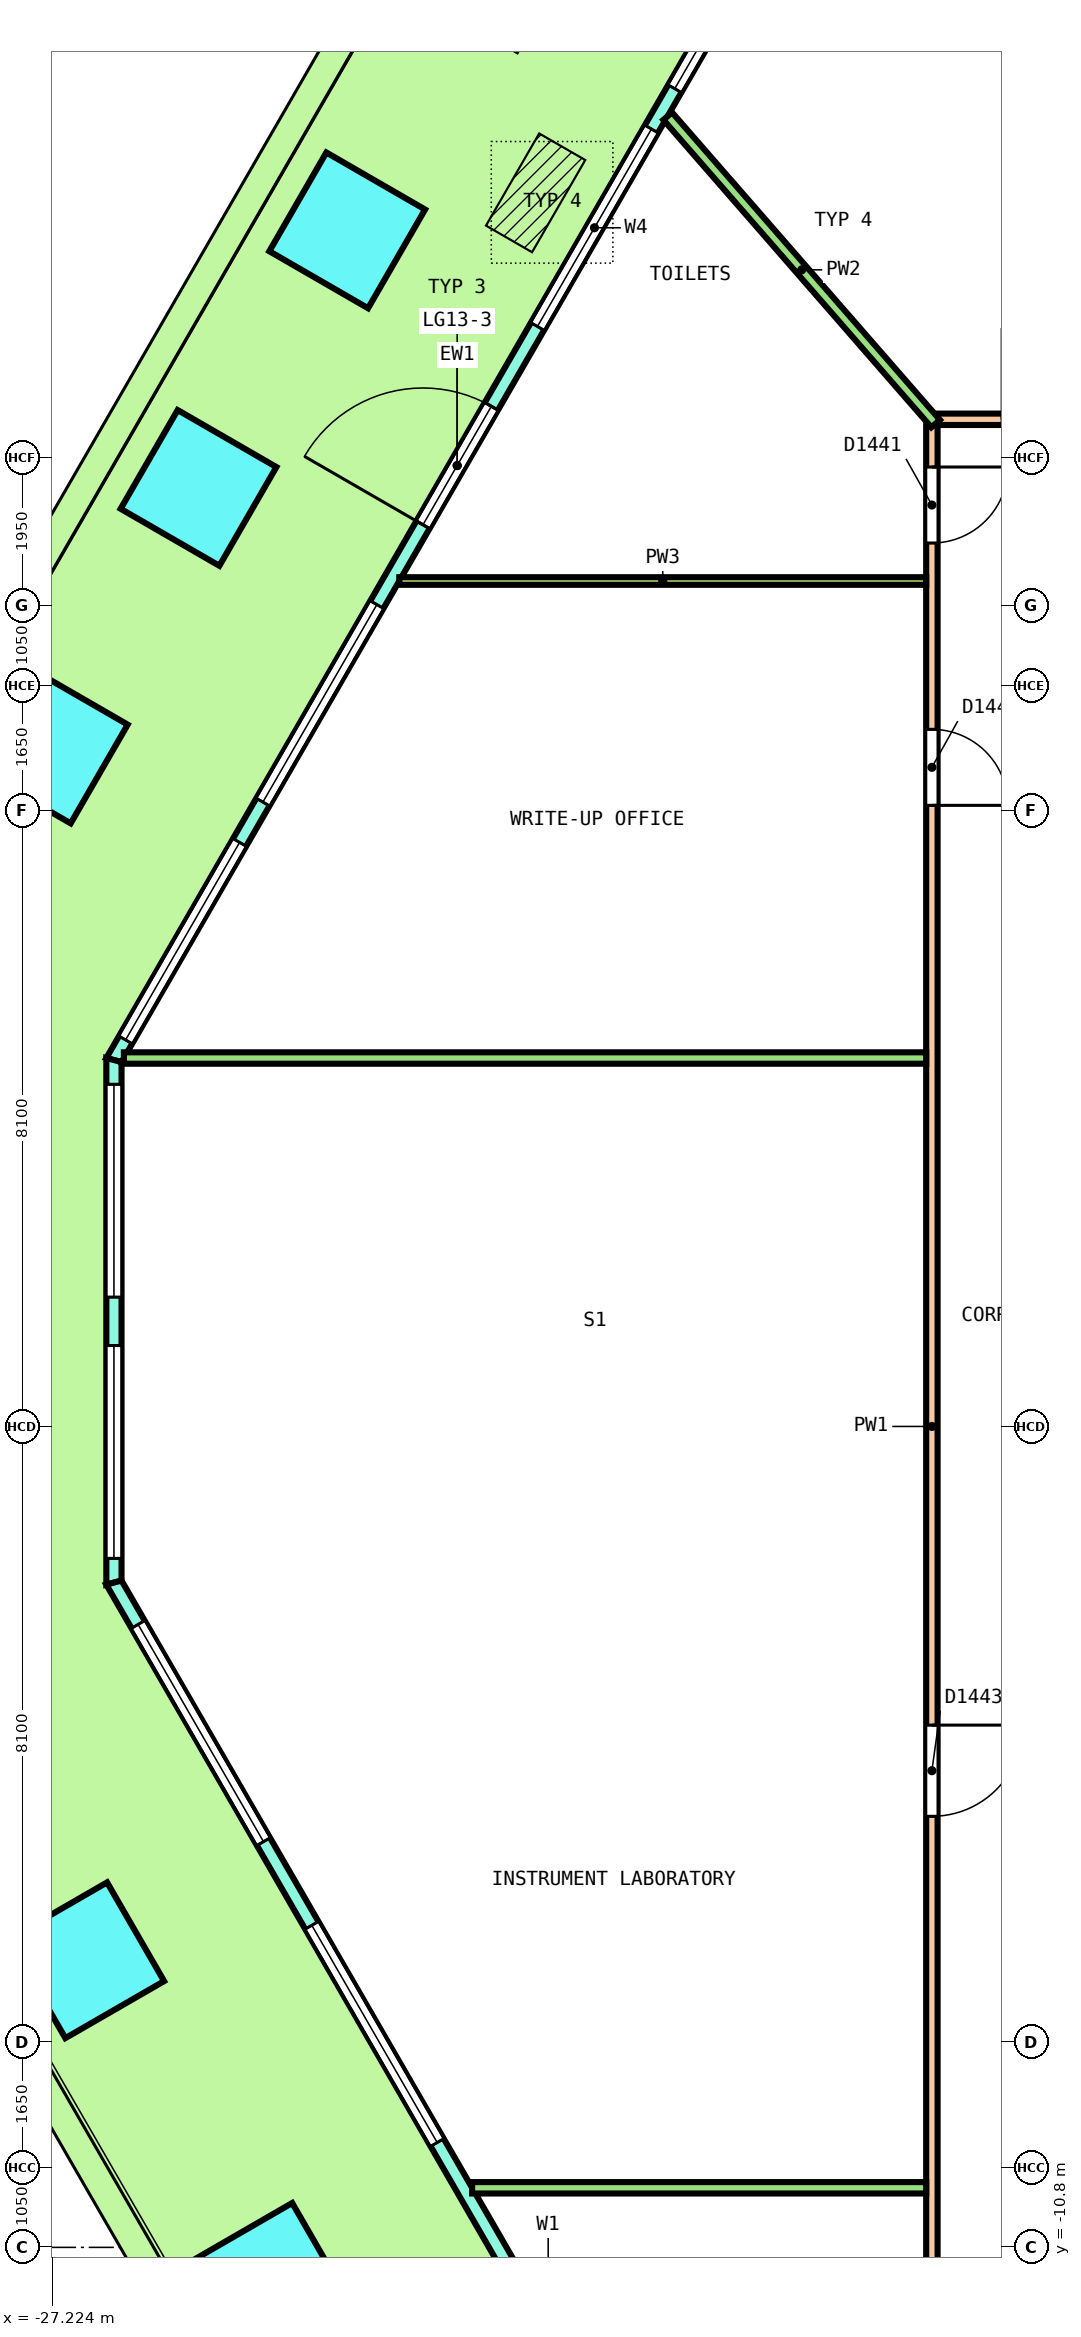
"""IFC4 building model, lengths in metres.
Left out: names, types, materials, properties, quantities, classifications, styles, units other than length and angle.
Written with IfcOpenShell. Run it as: python <this file> out.ifc"""

import sys

from ifc_helpers import new_model, si_unit, direction, frame, frame_2d, origin, origin_2d, place, context, subcontext, project, spatial, polyline, rectangle, outline, extrude, element, fill, save


model = new_model("IFC4")
c1 = context("Model", 3, precision=1e-05, world=origin(), true_north=direction((0.0, 1.0)))
c2 = subcontext(c1, "Body", "Model", "MODEL_VIEW")
j1 = project(units=[si_unit("LENGTHUNIT", "METRE"), si_unit("PLANEANGLEUNIT", "RADIAN")], contexts=[c1])
p1 = place(None, origin())
s1 = spatial("IfcSite", under=j1, at=p1, CompositionType="ELEMENT")
p2 = place(p1, origin())
s2 = spatial("IfcBuilding", under=s1, at=p2, CompositionType="ELEMENT")
p3 = place(p2, frame((0.0, 0.0, 58.6)))
s3 = spatial("IfcBuildingStorey", under=s2, at=p3, CompositionType="ELEMENT", Elevation=58.6)
for number, where, z_axis, x_axis in (
    (1, (-23.342, 15.736, 0.0), (0.0, 0.0, 1.0), (-0.5, -0.866, 0.0)),
    (2, (-25.299, 12.347, 0.0), (0.0, 0.0, 1.0), (-0.5, -0.866, 0.0)),
    (3, (-27.255, 8.959, 0.0), (0.0, 0.0, 1.0), (-0.5, -0.866, 0.0)),
    (4, (-26.776, -7.023, 0.0), (0.0, 0.0, 1.0), (0.5, -0.866, 0.0)),
    (5, (-24.341, -11.241, 0.0), (0.0, 0.0, 1.0), (0.5, -0.866, 0.0)),
):
    element("IfcColumn", number, at=place(p3, frame(where, z_axis=z_axis, x_axis=x_axis)), inside=s3, PredefinedType="COLUMN", context=c2, shape_type="SweptSolid", body=[
        extrude(rectangle(XDim=1.5, YDim=1.5, at=origin_2d()), origin(), (0.0, 0.0, 1.0), 4.05),
    ])
p4 = place(p3, frame((-17.38, 20.463, 0.0), z_axis=(0.0, 0.0, 1.0), x_axis=(-0.500000137386, -0.866025324465, 0.0)))
e6 = element("IfcWall", 6, at=p4, inside=s3, PredefinedType="SOLIDWALL", context=c2, shape_type="SweptSolid", body=[
    extrude(outline(polyline([(-0.027, -0.1), (0.979, -0.1), (1.986, -0.1), (2.992, -0.1), (3.999, -0.1), (5.005, -0.1), (6.012, -0.1), (7.018, -0.1), (8.025, -0.1), (9.031, -0.1), (10.038, -0.1), (11.044, -0.1), (12.051, -0.1), (13.057, -0.1), (14.063, -0.1), (15.07, -0.1), (16.076, -0.1), (17.083, -0.1), (18.089, -0.1), (18.036, 0.1), (17.035, 0.1), (16.035, 0.1), (15.034, 0.1), (14.034, 0.1), (13.033, 0.1), (12.033, 0.1), (11.032, 0.1), (10.032, 0.1), (9.031, 0.1), (8.031, 0.1), (7.03, 0.1), (6.03, 0.1), (5.029, 0.1), (4.029, 0.1), (3.028, 0.1), (2.028, 0.1), (1.027, 0.1), (0.027, 0.1), (-0.027, -0.1)])), origin(), (0.0, 0.0, 1.0), 4.1),
])
p5 = place(p4, frame((0.306, 0.0, 0.1)))
e7 = element("IfcOpeningElement", 7, at=p5, cuts=e6, PredefinedType="OPENING", context=c2, shape_type="SweptSolid", body=[
    extrude(rectangle(XDim=3.0, YDim=2.9, at=frame_2d((1.5, 1.45))), frame((0.0, 0.11, 0.0), z_axis=(0.0, -1.0, 0.0), x_axis=(1.0, 0.0, 0.0)), (0.0, 0.0, 1.0), 0.22),
])
p6 = place(p4, frame((3.919, 0.0, 0.1)))
e8 = element("IfcOpeningElement", 8, at=p6, cuts=e6, PredefinedType="OPENING", context=c2, shape_type="SweptSolid", body=[
    extrude(rectangle(XDim=3.0, YDim=2.9, at=frame_2d((1.5, 1.45))), frame((0.0, 0.11, 0.0), z_axis=(0.0, -1.0, 0.0), x_axis=(1.0, 0.0, 0.0)), (0.0, 0.0, 1.0), 0.22),
])
p7 = place(p4, frame((8.131, 0.0, 0.0)))
e9 = element("IfcOpeningElement", 9, at=p7, cuts=e6, PredefinedType="OPENING", context=c2, shape_type="SweptSolid", body=[
    extrude(rectangle(XDim=1.8, YDim=2.4, at=frame_2d((0.9, 1.2))), frame((0.0, 0.11, 0.0), z_axis=(0.0, -1.0, 0.0), x_axis=(1.0, 0.0, 0.0)), (0.0, 0.0, 1.0), 0.22),
])
p8 = place(p4, frame((8.131, 0.0, 2.55)))
e10 = element("IfcOpeningElement", 10, at=p8, cuts=e6, PredefinedType="OPENING", context=c2, shape_type="SweptSolid", body=[
    extrude(rectangle(XDim=1.8, YDim=0.45, at=frame_2d((0.9, 0.225))), frame((0.0, 0.11, 0.0), z_axis=(0.0, -1.0, 0.0), x_axis=(1.0, 0.0, 0.0)), (0.0, 0.0, 1.0), 0.22),
])
p9 = place(p4, frame((11.144, 0.0, 0.1)))
e11 = element("IfcOpeningElement", 11, at=p9, cuts=e6, PredefinedType="OPENING", context=c2, shape_type="SweptSolid", body=[
    extrude(rectangle(XDim=3.0, YDim=2.9, at=frame_2d((1.5, 1.45))), frame((0.0, 0.11, 0.0), z_axis=(0.0, -1.0, 0.0), x_axis=(1.0, 0.0, 0.0)), (0.0, 0.0, 1.0), 0.22),
])
p10 = place(p4, frame((14.756, 0.0, 0.1)))
e12 = element("IfcOpeningElement", 12, at=p10, cuts=e6, PredefinedType="OPENING", context=c2, shape_type="SweptSolid", body=[
    extrude(rectangle(XDim=3.0, YDim=2.9, at=frame_2d((1.5, 1.45))), frame((0.0, 0.11, 0.0), z_axis=(0.0, -1.0, 0.0), x_axis=(1.0, 0.0, 0.0)), (0.0, 0.0, 1.0), 0.22),
])
p11 = place(p3, frame((-26.411, 4.82, 0.0), z_axis=(0.0, 0.0, 1.0), x_axis=(0.0, -1.0, 0.0)))
e13 = element("IfcWall", 13, at=p11, inside=s3, PredefinedType="SOLIDWALL", context=c2, shape_type="SweptSolid", body=[
    extrude(outline(polyline([(-0.027, -0.1), (1.128, -0.1), (2.283, -0.1), (3.438, -0.1), (4.592, -0.1), (5.747, -0.1), (6.902, -0.1), (6.848, 0.1), (5.711, 0.1), (4.574, 0.1), (3.438, 0.1), (2.301, 0.1), (1.164, 0.1), (0.027, 0.1), (-0.027, -0.1)])), origin(), (0.0, 0.0, 1.0), 4.1),
])
p12 = place(p11, frame((0.319, 0.0, 0.1)))
e14 = element("IfcOpeningElement", 14, at=p12, cuts=e13, PredefinedType="OPENING", context=c2, shape_type="SweptSolid", body=[
    extrude(rectangle(XDim=2.8, YDim=2.9, at=frame_2d((1.4, 1.45))), frame((0.0, 0.11, 0.0), z_axis=(0.0, -1.0, 0.0), x_axis=(1.0, 0.0, 0.0)), (0.0, 0.0, 1.0), 0.22),
])
p13 = place(p11, frame((3.756, 0.0, 0.1)))
e15 = element("IfcOpeningElement", 15, at=p13, cuts=e13, PredefinedType="OPENING", context=c2, shape_type="SweptSolid", body=[
    extrude(rectangle(XDim=2.8, YDim=2.9, at=frame_2d((1.4, 1.45))), frame((0.0, 0.11, 0.0), z_axis=(0.0, -1.0, 0.0), x_axis=(1.0, 0.0, 0.0)), (0.0, 0.0, 1.0), 0.22),
])
p14 = place(p3, frame((-26.411, -2.055, 0.0), z_axis=(0.0, 0.0, 1.0), x_axis=(0.50000204422, -0.86602422355, 0.0)))
e16 = element("IfcWall", 16, at=p14, inside=s3, PredefinedType="SOLIDWALL", context=c2, shape_type="SweptSolid", body=[
    extrude(outline(polyline([(-0.027, -0.1), (1.014, -0.1), (2.055, -0.1), (3.097, -0.1), (4.138, -0.1), (5.179, -0.1), (6.22, -0.1), (7.261, -0.1), (8.303, -0.1), (9.344, -0.1), (10.385, -0.1), (11.426, -0.1), (12.468, -0.1), (13.509, -0.1), (14.55, -0.1), (15.591, -0.1), (16.632, -0.1), (17.673, -0.1), (18.715, -0.1), (19.756, -0.1), (20.797, -0.1), (21.838, -0.1), (22.879, -0.1), (22.826, 0.1), (21.789, 0.1), (20.753, 0.1), (19.717, 0.1), (18.68, 0.1), (17.644, 0.1), (16.608, 0.1), (15.572, 0.1), (14.535, 0.1), (13.499, 0.1), (12.463, 0.1), (11.426, 0.1), (10.39, 0.1), (9.354, 0.1), (8.317, 0.1), (7.281, 0.1), (6.245, 0.1), (5.208, 0.1), (4.172, 0.1), (3.136, 0.1), (2.099, 0.1), (1.063, 0.1), (0.027, 0.1), (-0.027, -0.1)])), origin(), (0.0, 0.0, 1.0), 4.1),
])
p15 = place(p14, frame((0.635, 0.0, 0.1)))
e17 = element("IfcOpeningElement", 17, at=p15, cuts=e16, PredefinedType="OPENING", context=c2, shape_type="SweptSolid", body=[
    extrude(rectangle(XDim=3.3, YDim=2.9, at=frame_2d((1.65, 1.45))), frame((0.0, 0.11, 0.0), z_axis=(0.0, -1.0, 0.0), x_axis=(1.0, 0.0, 0.0)), (0.0, 0.0, 1.0), 0.22),
])
p16 = place(p14, frame((5.206, 0.0, 0.1)))
e18 = element("IfcOpeningElement", 18, at=p16, cuts=e16, PredefinedType="OPENING", context=c2, shape_type="SweptSolid", body=[
    extrude(rectangle(XDim=3.3, YDim=2.9, at=frame_2d((1.65, 1.45))), frame((0.0, 0.11, 0.0), z_axis=(0.0, -1.0, 0.0), x_axis=(1.0, 0.0, 0.0)), (0.0, 0.0, 1.0), 0.22),
])
p17 = place(p14, frame((10.526, 0.0, 0.0)))
e19 = element("IfcOpeningElement", 19, at=p17, cuts=e16, PredefinedType="OPENING", context=c2, shape_type="SweptSolid", body=[
    extrude(rectangle(XDim=1.8, YDim=2.4, at=frame_2d((0.9, 1.2))), frame((0.0, 0.11, 0.0), z_axis=(0.0, -1.0, 0.0), x_axis=(1.0, 0.0, 0.0)), (0.0, 0.0, 1.0), 0.22),
])
p18 = place(p14, frame((10.526, 0.0, 2.55)))
e20 = element("IfcOpeningElement", 20, at=p18, cuts=e16, PredefinedType="OPENING", context=c2, shape_type="SweptSolid", body=[
    extrude(rectangle(XDim=1.8, YDim=0.45, at=frame_2d((0.9, 0.225))), frame((0.0, 0.11, 0.0), z_axis=(0.0, -1.0, 0.0), x_axis=(1.0, 0.0, 0.0)), (0.0, 0.0, 1.0), 0.22),
])
p19 = place(p14, frame((14.347, 0.0, 0.1)))
e21 = element("IfcOpeningElement", 21, at=p19, cuts=e16, PredefinedType="OPENING", context=c2, shape_type="SweptSolid", body=[
    extrude(rectangle(XDim=3.3, YDim=2.9, at=frame_2d((1.65, 1.45))), frame((0.0, 0.11, 0.0), z_axis=(0.0, -1.0, 0.0), x_axis=(1.0, 0.0, 0.0)), (0.0, 0.0, 1.0), 0.22),
])
p20 = place(p14, frame((18.917, 0.0, 0.1)))
e22 = element("IfcOpeningElement", 22, at=p20, cuts=e16, PredefinedType="OPENING", context=c2, shape_type="SweptSolid", body=[
    extrude(rectangle(XDim=3.3, YDim=2.9, at=frame_2d((1.65, 1.45))), frame((0.0, 0.11, 0.0), z_axis=(0.0, -1.0, 0.0), x_axis=(1.0, 0.0, 0.0)), (0.0, 0.0, 1.0), 0.22),
])
p21 = place(p3, frame((-15.575, 13.25, 0.0), z_axis=(0.0, 0.0, 1.0), x_axis=(1.0, 0.0, 0.0)))
e23 = element("IfcWall", 23, at=p21, inside=s3, PredefinedType="PARTITIONING", context=c2, shape_type="SweptSolid", body=[
    extrude(rectangle(XDim=31.175, YDim=0.15, at=frame_2d((15.587, 0.0))), origin(), (0.0, 0.0, 1.0), 3.05),
])
p22 = place(p21, frame((28.252, 0.0, 0.0)))
e24 = element("IfcOpeningElement", 24, at=p22, cuts=e23, PredefinedType="OPENING", context=c2, shape_type="SweptSolid", body=[
    extrude(rectangle(XDim=1.0, YDim=2.1, at=frame_2d((0.5, 1.05))), frame((0.0, 0.085, 0.0), z_axis=(0.0, -1.0, 0.0), x_axis=(1.0, 0.0, 0.0)), (0.0, 0.0, 1.0), 0.17),
])
p23 = place(p21, frame((14.802, 0.0, 0.0)))
e25 = element("IfcOpeningElement", 25, at=p23, cuts=e23, PredefinedType="OPENING", context=c2, shape_type="SweptSolid", body=[
    extrude(rectangle(XDim=1.2, YDim=2.1, at=frame_2d((0.6, 1.05))), frame((0.0, 0.085, 0.0), z_axis=(0.0, -1.0, 0.0), x_axis=(1.0, 0.0, 0.0)), (0.0, 0.0, 1.0), 0.17),
])
p24 = place(p21, frame((5.812, 0.0, 0.0)))
e26 = element("IfcOpeningElement", 26, at=p24, cuts=e23, PredefinedType="OPENING", context=c2, shape_type="SweptSolid", body=[
    extrude(rectangle(XDim=1.2, YDim=2.1, at=frame_2d((0.6, 1.05))), frame((0.0, 0.085, 0.0), z_axis=(0.0, -1.0, 0.0), x_axis=(1.0, 0.0, 0.0)), (0.0, 0.0, 1.0), 0.17),
])
p25 = place(p21, frame((0.849, 0.0, 0.0)))
e27 = element("IfcOpeningElement", 27, at=p25, cuts=e23, PredefinedType="OPENING", context=c2, shape_type="SweptSolid", body=[
    extrude(rectangle(XDim=1.2, YDim=2.1, at=frame_2d((0.6, 1.05))), frame((0.0, 0.085, 0.0), z_axis=(0.0, -1.0, 0.0), x_axis=(1.0, 0.0, 0.0)), (0.0, 0.0, 1.0), 0.17),
])
p26 = place(p3, frame((-15.65, -13.175, 0.0), z_axis=(0.0, 0.0, 1.0), x_axis=(0.0, 1.0, 0.0)))
e28 = element("IfcWall", 28, at=p26, inside=s3, PredefinedType="PARTITIONING", context=c2, shape_type="SweptSolid", body=[
    extrude(rectangle(XDim=26.35, YDim=0.15, at=frame_2d((13.175, 0.0))), origin(), (0.0, 0.0, 1.0), 3.05),
])
p27 = place(p26, frame((24.797, 0.0, 0.0)))
e29 = element("IfcOpeningElement", 29, at=p27, cuts=e28, PredefinedType="OPENING", context=c2, shape_type="SweptSolid", body=[
    extrude(rectangle(XDim=1.0, YDim=2.1, at=frame_2d((0.5, 1.05))), frame((0.0, 0.085, 0.0), z_axis=(0.0, -1.0, 0.0), x_axis=(1.0, 0.0, 0.0)), (0.0, 0.0, 1.0), 0.17),
])
p28 = place(p26, frame((21.346, 0.0, 0.0)))
e30 = element("IfcOpeningElement", 30, at=p28, cuts=e28, PredefinedType="OPENING", context=c2, shape_type="SweptSolid", body=[
    extrude(rectangle(XDim=1.0, YDim=2.1, at=frame_2d((0.5, 1.05))), frame((0.0, 0.085, 0.0), z_axis=(0.0, -1.0, 0.0), x_axis=(1.0, 0.0, 0.0)), (0.0, 0.0, 1.0), 0.17),
])
p29 = place(p26, frame((8.046, 0.0, 0.0)))
e31 = element("IfcOpeningElement", 31, at=p29, cuts=e28, PredefinedType="OPENING", context=c2, shape_type="SweptSolid", body=[
    extrude(rectangle(XDim=1.2, YDim=2.1, at=frame_2d((0.6, 1.05))), frame((0.0, 0.085, 0.0), z_axis=(0.0, -1.0, 0.0), x_axis=(1.0, 0.0, 0.0)), (0.0, 0.0, 1.0), 0.17),
])
p30 = place(p3, frame((-19.126, 17.239, 0.0), z_axis=(0.0, 0.0, 1.0), x_axis=(0.65698603945, -0.753902741717, 0.0)))
e32 = element("IfcWall", 32, at=p30, inside=s3, PredefinedType="PARTITIONING", context=c2, shape_type="SweptSolid", body=[
    extrude(rectangle(XDim=5.366, YDim=0.15, at=frame_2d((2.683, 0.0))), origin(), (0.0, 0.0, 1.0), 3.05),
])
p31 = place(p3, frame((-26.28, 4.847, 0.0), z_axis=(0.0, 0.0, 1.0), x_axis=(1.0, 0.0, 0.0)))
e33 = element("IfcWall", 33, at=p31, inside=s3, PredefinedType="PARTITIONING", context=c2, shape_type="SweptSolid", body=[
    extrude(rectangle(XDim=10.555, YDim=0.15, at=frame_2d((5.278, 0.0))), origin(), (0.0, 0.0, 1.0), 3.05),
])
p32 = place(p3, frame((-21.699, -10.016, 0.0), z_axis=(0.0, 0.0, 1.0), x_axis=(1.0, 0.0, 0.0)))
e34 = element("IfcWall", 34, at=p32, inside=s3, PredefinedType="PARTITIONING", context=c2, shape_type="SweptSolid", body=[
    extrude(rectangle(XDim=5.974, YDim=0.15, at=frame_2d((2.987, 0.0))), origin(), (0.0, 0.0, 1.0), 3.05),
])
p33 = place(p3, frame((-22.657, 11.123, 0.0), z_axis=(0.0, 0.0, 1.0), x_axis=(1.0, 0.0, 0.0)))
e35 = element("IfcWall", 35, at=p33, inside=s3, PredefinedType="PARTITIONING", context=c2, shape_type="SweptSolid", body=[
    extrude(rectangle(XDim=6.932, YDim=0.1, at=frame_2d((3.466, 0.0))), origin(), (0.0, 0.0, 1.0), 3.05),
])
p34 = place(p5, origin())
e36 = element("IfcWindow", 36, at=p34, inside=s3, PartitioningType="SINGLE_PANEL", PredefinedType="WINDOW", context=c2, shape_type="SweptSolid", body=[
    extrude(rectangle(XDim=3.0, YDim=2.9, at=frame_2d((1.5, 1.45))), frame((0.0, 0.03, 0.0), z_axis=(0.0, -1.0, 0.0), x_axis=(1.0, 0.0, 0.0)), (0.0, 0.0, 1.0), 0.06),
])
fill(e7, e36)
p35 = place(p6, origin())
e37 = element("IfcWindow", 37, at=p35, inside=s3, PartitioningType="SINGLE_PANEL", PredefinedType="WINDOW", context=c2, shape_type="SweptSolid", body=[
    extrude(rectangle(XDim=3.0, YDim=2.9, at=frame_2d((1.5, 1.45))), frame((0.0, 0.03, 0.0), z_axis=(0.0, -1.0, 0.0), x_axis=(1.0, 0.0, 0.0)), (0.0, 0.0, 1.0), 0.06),
])
fill(e8, e37)
p36 = place(p7, origin())
e38 = element("IfcDoor", 38, at=p36, inside=s3, OperationType="DOUBLE_DOOR_SINGLE_SWING", PredefinedType="DOOR", context=c2, shape_type="SweptSolid", body=[
    extrude(rectangle(XDim=1.8, YDim=2.4, at=frame_2d((0.9, 1.2))), frame((0.0, 0.025, 0.0), z_axis=(0.0, -1.0, 0.0), x_axis=(1.0, 0.0, 0.0)), (0.0, 0.0, 1.0), 0.05),
])
fill(e9, e38)
p37 = place(p8, origin())
e39 = element("IfcWindow", 39, at=p37, inside=s3, PartitioningType="SINGLE_PANEL", PredefinedType="WINDOW", context=c2, shape_type="SweptSolid", body=[
    extrude(rectangle(XDim=1.8, YDim=0.45, at=frame_2d((0.9, 0.225))), frame((0.0, 0.03, 0.0), z_axis=(0.0, -1.0, 0.0), x_axis=(1.0, 0.0, 0.0)), (0.0, 0.0, 1.0), 0.06),
])
fill(e10, e39)
p38 = place(p9, origin())
e40 = element("IfcWindow", 40, at=p38, inside=s3, PartitioningType="SINGLE_PANEL", PredefinedType="WINDOW", context=c2, shape_type="SweptSolid", body=[
    extrude(rectangle(XDim=3.0, YDim=2.9, at=frame_2d((1.5, 1.45))), frame((0.0, 0.03, 0.0), z_axis=(0.0, -1.0, 0.0), x_axis=(1.0, 0.0, 0.0)), (0.0, 0.0, 1.0), 0.06),
])
fill(e11, e40)
p39 = place(p10, origin())
e41 = element("IfcWindow", 41, at=p39, inside=s3, PartitioningType="SINGLE_PANEL", PredefinedType="WINDOW", context=c2, shape_type="SweptSolid", body=[
    extrude(rectangle(XDim=3.0, YDim=2.9, at=frame_2d((1.5, 1.45))), frame((0.0, 0.03, 0.0), z_axis=(0.0, -1.0, 0.0), x_axis=(1.0, 0.0, 0.0)), (0.0, 0.0, 1.0), 0.06),
])
fill(e12, e41)
p40 = place(p12, origin())
e42 = element("IfcWindow", 42, at=p40, inside=s3, PartitioningType="SINGLE_PANEL", PredefinedType="WINDOW", context=c2, shape_type="SweptSolid", body=[
    extrude(rectangle(XDim=2.8, YDim=2.9, at=frame_2d((1.4, 1.45))), frame((0.0, 0.03, 0.0), z_axis=(0.0, -1.0, 0.0), x_axis=(1.0, 0.0, 0.0)), (0.0, 0.0, 1.0), 0.06),
])
fill(e14, e42)
p41 = place(p13, origin())
e43 = element("IfcWindow", 43, at=p41, inside=s3, PartitioningType="SINGLE_PANEL", PredefinedType="WINDOW", context=c2, shape_type="SweptSolid", body=[
    extrude(rectangle(XDim=2.8, YDim=2.9, at=frame_2d((1.4, 1.45))), frame((0.0, 0.03, 0.0), z_axis=(0.0, -1.0, 0.0), x_axis=(1.0, 0.0, 0.0)), (0.0, 0.0, 1.0), 0.06),
])
fill(e15, e43)
p42 = place(p15, origin())
e44 = element("IfcWindow", 44, at=p42, inside=s3, PartitioningType="SINGLE_PANEL", PredefinedType="WINDOW", context=c2, shape_type="SweptSolid", body=[
    extrude(rectangle(XDim=3.3, YDim=2.9, at=frame_2d((1.65, 1.45))), frame((0.0, 0.03, 0.0), z_axis=(0.0, -1.0, 0.0), x_axis=(1.0, 0.0, 0.0)), (0.0, 0.0, 1.0), 0.06),
])
fill(e17, e44)
p43 = place(p16, origin())
e45 = element("IfcWindow", 45, at=p43, inside=s3, PartitioningType="SINGLE_PANEL", PredefinedType="WINDOW", context=c2, shape_type="SweptSolid", body=[
    extrude(rectangle(XDim=3.3, YDim=2.9, at=frame_2d((1.65, 1.45))), frame((0.0, 0.03, 0.0), z_axis=(0.0, -1.0, 0.0), x_axis=(1.0, 0.0, 0.0)), (0.0, 0.0, 1.0), 0.06),
])
fill(e18, e45)
p44 = place(p27, origin())
e46 = element("IfcDoor", 46, at=p44, inside=s3, OperationType="SINGLE_SWING_RIGHT", PredefinedType="DOOR", context=c2, shape_type="SweptSolid", body=[
    extrude(rectangle(XDim=1.0, YDim=2.1, at=frame_2d((0.5, 1.05))), frame((0.0, 0.025, 0.0), z_axis=(0.0, -1.0, 0.0), x_axis=(1.0, 0.0, 0.0)), (0.0, 0.0, 1.0), 0.05),
])
fill(e29, e46)
p45 = place(p28, origin())
e47 = element("IfcDoor", 47, at=p45, inside=s3, OperationType="SINGLE_SWING_LEFT", PredefinedType="DOOR", context=c2, shape_type="SweptSolid", body=[
    extrude(rectangle(XDim=1.0, YDim=2.1, at=frame_2d((0.5, 1.05))), frame((0.0, 0.025, 0.0), z_axis=(0.0, -1.0, 0.0), x_axis=(1.0, 0.0, 0.0)), (0.0, 0.0, 1.0), 0.05),
])
fill(e30, e47)
p46 = place(p29, origin())
e48 = element("IfcDoor", 48, at=p46, inside=s3, OperationType="DOUBLE_DOOR_SINGLE_SWING", PredefinedType="DOOR", context=c2, shape_type="SweptSolid", body=[
    extrude(rectangle(XDim=1.2, YDim=2.1, at=frame_2d((0.6, 1.05))), frame((0.0, 0.025, 0.0), z_axis=(0.0, -1.0, 0.0), x_axis=(1.0, 0.0, 0.0)), (0.0, 0.0, 1.0), 0.05),
])
fill(e31, e48)
save(model, sys.argv[1])
